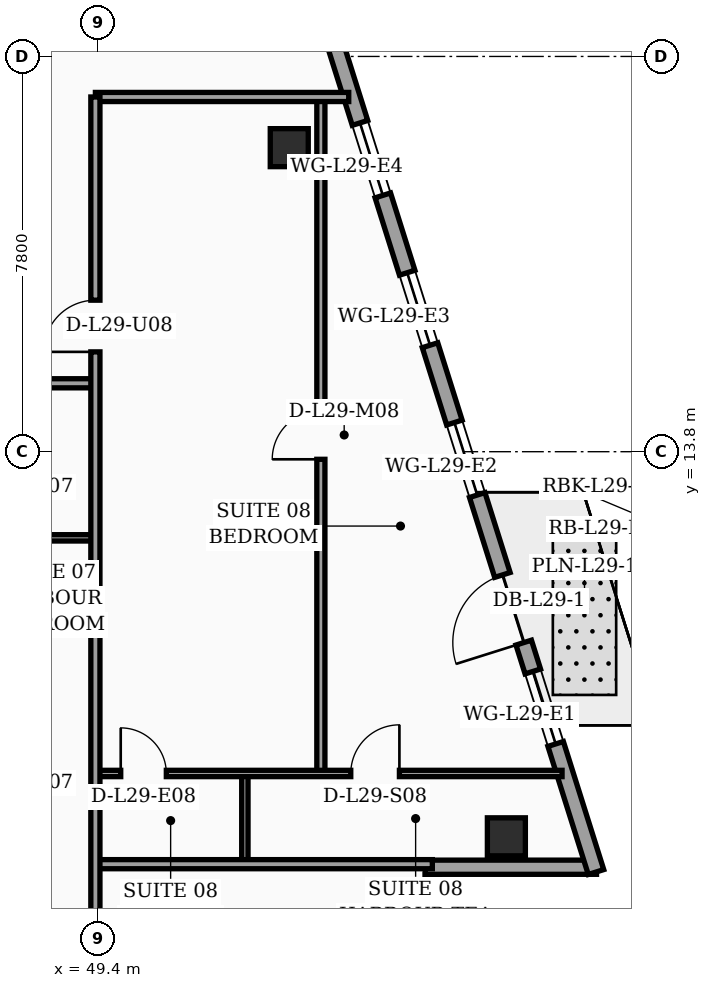
"""IFC4 building model, lengths in metres.
Left out: names, types, materials, properties, quantities, classifications, styles, units other than length and angle.
Written with IfcOpenShell. Run it as: python <this file> out.ifc"""

import sys

from ifc_helpers import new_model, si_unit, direction, frame, frame_2d, origin, origin_2d, place, context, subcontext, project, spatial, rectangle, hollow_rectangle, extrude, element, fill, save


model = new_model("IFC4")
c1 = context("Model", 3, precision=1e-05, world=origin(), true_north=direction((0.0, 1.0)))
c2 = subcontext(c1, "Body", "Model", "MODEL_VIEW")
j1 = project(units=[si_unit("LENGTHUNIT", "METRE"), si_unit("PLANEANGLEUNIT", "RADIAN")], contexts=[c1])
p1 = place(None, origin())
s1 = spatial("IfcSite", under=j1, at=p1, CompositionType="ELEMENT")
p2 = place(p1, origin())
s2 = spatial("IfcBuilding", under=s1, at=p2, CompositionType="ELEMENT")
p3 = place(p2, frame((0.0, 0.0, 120.2)))
s3 = spatial("IfcBuildingStorey", under=s2, at=p3, CompositionType="ELEMENT", Elevation=120.2)
for number, where, z_axis, x_axis in (
    (1, (57.461, 6.2, 0.0), (0.0, 0.0, 1.0), (1.0, 0.0, 0.0)),
    (2, (53.176, 19.8, 0.0), (0.0, 0.0, 1.0), (1.0, 0.0, 0.0)),
):
    element("IfcColumn", number, at=place(p3, frame(where, z_axis=z_axis, x_axis=x_axis)), inside=s3, PredefinedType="COLUMN", context=c2, shape_type="SweptSolid", body=[
        extrude(hollow_rectangle(XDim=0.75, YDim=0.75, WallThickness=0.032, at=origin_2d()), origin(), (0.0, 0.0, 1.0), 3.56),
    ])
p4 = place(p3, frame((56.0, 2.52, 0.0), z_axis=(0.0, 0.0, 1.0), x_axis=(0.0, 1.0, 0.0)))
e3 = element("IfcWall", 3, at=p4, inside=s3, PredefinedType="SOLIDWALL", context=c2, shape_type="SweptSolid", body=[
    extrude(rectangle(XDim=2.94, YDim=0.28, at=frame_2d((1.47, 0.0))), origin(), (0.0, 0.0, 1.0), 3.04),
])
p5 = place(p3, frame((55.86, 5.6, 0.0), z_axis=(0.0, 0.0, 1.0), x_axis=(1.0, 0.0, 0.0)))
e4 = element("IfcWall", 4, at=p5, inside=s3, PredefinedType="SOLIDWALL", context=c2, shape_type="SweptSolid", body=[
    extrude(rectangle(XDim=3.38, YDim=0.28, at=frame_2d((1.69, 0.0))), origin(), (0.0, 0.0, 1.0), 3.04),
])
p6 = place(p3, frame((59.23, 5.505, 0.0), z_axis=(0.0, 0.0, 1.0), x_axis=(-0.300509063924, 0.953778958931, 0.0)))
e5 = element("IfcWall", 5, at=p6, inside=s3, PredefinedType="SOLIDWALL", context=c2, shape_type="SweptSolid", body=[
    extrude(rectangle(XDim=30.814, YDim=0.32, at=frame_2d((15.407, 0.0))), origin(), (0.0, 0.0, 1.0), 3.56),
])
p7 = place(p6, frame((4.747, 0.0, 0.0)))
e6 = element("IfcOpeningElement", 6, at=p7, cuts=e5, PredefinedType="OPENING", context=c2, shape_type="SweptSolid", body=[
    extrude(rectangle(XDim=1.4, YDim=2.25, at=frame_2d((0.7, 1.125))), frame((0.0, 0.17, 0.0), z_axis=(0.0, -1.0, 0.0), x_axis=(1.0, 0.0, 0.0)), (0.0, 0.0, 1.0), 0.34),
])
p8 = place(p6, frame((2.65, 0.0, 0.75)))
e7 = element("IfcOpeningElement", 7, at=p8, cuts=e5, PredefinedType="OPENING", context=c2, shape_type="SweptSolid", body=[
    extrude(rectangle(XDim=1.5, YDim=1.6, at=frame_2d((0.75, 0.8))), frame((0.0, 0.17, 0.0), z_axis=(0.0, -1.0, 0.0), x_axis=(1.0, 0.0, 0.0)), (0.0, 0.0, 1.0), 0.34),
])
p9 = place(p6, frame((7.8, 0.0, 0.75)))
e8 = element("IfcOpeningElement", 8, at=p9, cuts=e5, PredefinedType="OPENING", context=c2, shape_type="SweptSolid", body=[
    extrude(rectangle(XDim=1.5, YDim=1.6, at=frame_2d((0.75, 0.8))), frame((0.0, 0.17, 0.0), z_axis=(0.0, -1.0, 0.0), x_axis=(1.0, 0.0, 0.0)), (0.0, 0.0, 1.0), 0.34),
])
p10 = place(p6, frame((10.9, 0.0, 0.75)))
e9 = element("IfcOpeningElement", 9, at=p10, cuts=e5, PredefinedType="OPENING", context=c2, shape_type="SweptSolid", body=[
    extrude(rectangle(XDim=1.5, YDim=1.6, at=frame_2d((0.75, 0.8))), frame((0.0, 0.17, 0.0), z_axis=(0.0, -1.0, 0.0), x_axis=(1.0, 0.0, 0.0)), (0.0, 0.0, 1.0), 0.34),
])
p11 = place(p6, frame((14.0, 0.0, 0.75)))
e10 = element("IfcOpeningElement", 10, at=p11, cuts=e5, PredefinedType="OPENING", context=c2, shape_type="SweptSolid", body=[
    extrude(rectangle(XDim=1.5, YDim=1.6, at=frame_2d((0.75, 0.8))), frame((0.0, 0.17, 0.0), z_axis=(0.0, -1.0, 0.0), x_axis=(1.0, 0.0, 0.0)), (0.0, 0.0, 1.0), 0.34),
])
p12 = place(p6, frame((17.1, 0.0, 0.75)))
e11 = element("IfcOpeningElement", 11, at=p12, cuts=e5, PredefinedType="OPENING", context=c2, shape_type="SweptSolid", body=[
    extrude(rectangle(XDim=1.5, YDim=1.6, at=frame_2d((0.75, 0.8))), frame((0.0, 0.17, 0.0), z_axis=(0.0, -1.0, 0.0), x_axis=(1.0, 0.0, 0.0)), (0.0, 0.0, 1.0), 0.34),
])
p13 = place(p6, frame((20.2, 0.0, 0.75)))
e12 = element("IfcOpeningElement", 12, at=p13, cuts=e5, PredefinedType="OPENING", context=c2, shape_type="SweptSolid", body=[
    extrude(rectangle(XDim=1.5, YDim=1.6, at=frame_2d((0.75, 0.8))), frame((0.0, 0.17, 0.0), z_axis=(0.0, -1.0, 0.0), x_axis=(1.0, 0.0, 0.0)), (0.0, 0.0, 1.0), 0.34),
])
p14 = place(p6, frame((23.3, 0.0, 0.75)))
e13 = element("IfcOpeningElement", 13, at=p14, cuts=e5, PredefinedType="OPENING", context=c2, shape_type="SweptSolid", body=[
    extrude(rectangle(XDim=1.5, YDim=1.6, at=frame_2d((0.75, 0.8))), frame((0.0, 0.17, 0.0), z_axis=(0.0, -1.0, 0.0), x_axis=(1.0, 0.0, 0.0)), (0.0, 0.0, 1.0), 0.34),
])
p15 = place(p6, frame((26.4, 0.0, 0.75)))
e14 = element("IfcOpeningElement", 14, at=p15, cuts=e5, PredefinedType="OPENING", context=c2, shape_type="SweptSolid", body=[
    extrude(rectangle(XDim=1.5, YDim=1.6, at=frame_2d((0.75, 0.8))), frame((0.0, 0.17, 0.0), z_axis=(0.0, -1.0, 0.0), x_axis=(1.0, 0.0, 0.0)), (0.0, 0.0, 1.0), 0.34),
])
p16 = place(p3, frame((47.42, 12.1, 0.0), z_axis=(0.0, 0.0, 1.0), x_axis=(1.0, 0.0, 0.0)))
e15 = element("IfcWall", 15, at=p16, inside=s3, PredefinedType="PARTITIONING", context=c2, shape_type="SweptSolid", body=[
    extrude(rectangle(XDim=1.93, YDim=0.125, at=frame_2d((0.965, 0.0))), origin(), (0.0, 0.0, 1.0), 2.84),
])
p17 = place(p3, frame((32.4, 15.15, 0.0), z_axis=(0.0, 0.0, 1.0), x_axis=(1.0, 0.0, 0.0)))
e16 = element("IfcWall", 16, at=p17, inside=s3, PredefinedType="PARTITIONING", context=c2, shape_type="SweptSolid", body=[
    extrude(rectangle(XDim=16.95, YDim=0.18, at=frame_2d((8.475, 0.0))), origin(), (0.0, 0.0, 1.0), 2.84),
])
p18 = place(p17, frame((1.1, 0.0, 0.0)))
e17 = element("IfcOpeningElement", 17, at=p18, cuts=e16, PredefinedType="OPENING", context=c2, shape_type="SweptSolid", body=[
    extrude(rectangle(XDim=1.5, YDim=2.22, at=frame_2d((0.75, 1.11))), frame((0.0, 0.1, 0.0), z_axis=(0.0, -1.0, 0.0), x_axis=(1.0, 0.0, 0.0)), (0.0, 0.0, 1.0), 0.2),
])
p19 = place(p17, frame((6.78, 0.0, 0.0)))
e18 = element("IfcOpeningElement", 18, at=p19, cuts=e16, PredefinedType="OPENING", context=c2, shape_type="SweptSolid", body=[
    extrude(rectangle(XDim=1.02, YDim=2.2, at=frame_2d((0.51, 1.1))), frame((0.0, 0.1, 0.0), z_axis=(0.0, -1.0, 0.0), x_axis=(1.0, 0.0, 0.0)), (0.0, 0.0, 1.0), 0.2),
])
p20 = place(p17, frame((12.69, 0.0, 0.0)))
e19 = element("IfcOpeningElement", 19, at=p20, cuts=e16, PredefinedType="OPENING", context=c2, shape_type="SweptSolid", body=[
    extrude(rectangle(XDim=1.02, YDim=2.2, at=frame_2d((0.51, 1.1))), frame((0.0, 0.1, 0.0), z_axis=(0.0, -1.0, 0.0), x_axis=(1.0, 0.0, 0.0)), (0.0, 0.0, 1.0), 0.2),
])
p21 = place(p3, frame((52.3, 5.66, 0.0), z_axis=(0.0, 0.0, 1.0), x_axis=(0.0, 1.0, 0.0)))
e20 = element("IfcWall", 20, at=p21, inside=s3, PredefinedType="PARTITIONING", context=c2, shape_type="SweptSolid", body=[
    extrude(rectangle(XDim=1.79, YDim=0.125, at=frame_2d((0.895, 0.0))), origin(), (0.0, 0.0, 1.0), 3.56),
])
p22 = place(p3, frame((53.8, 7.45, 0.0), z_axis=(0.0, 0.0, 1.0), x_axis=(0.0, 1.0, 0.0)))
e21 = element("IfcWall", 21, at=p22, inside=s3, PredefinedType="PARTITIONING", context=c2, shape_type="SweptSolid", body=[
    extrude(rectangle(XDim=13.35, YDim=0.16, at=frame_2d((6.675, 0.0))), origin(), (0.0, 0.0, 1.0), 3.04),
])
p23 = place(p22, frame((6.2, 0.0, 0.0)))
e22 = element("IfcOpeningElement", 22, at=p23, cuts=e21, PredefinedType="OPENING", context=c2, shape_type="SweptSolid", body=[
    extrude(rectangle(XDim=0.96, YDim=2.2, at=frame_2d((0.48, 1.1))), frame((0.0, 0.09, 0.0), z_axis=(0.0, -1.0, 0.0), x_axis=(1.0, 0.0, 0.0)), (0.0, 0.0, 1.0), 0.18),
])
p24 = place(p3, frame((49.35, 7.45, 0.0), z_axis=(0.0, 0.0, 1.0), x_axis=(1.0, 0.0, 0.0)))
e23 = element("IfcWall", 23, at=p24, inside=s3, PredefinedType="PARTITIONING", context=c2, shape_type="SweptSolid", body=[
    extrude(rectangle(XDim=9.21, YDim=0.125, at=frame_2d((4.605, 0.0))), origin(), (0.0, 0.0, 1.0), 3.04),
])
p25 = place(p24, frame((0.5, 0.0, 0.0)))
e24 = element("IfcOpeningElement", 24, at=p25, cuts=e23, PredefinedType="OPENING", context=c2, shape_type="SweptSolid", body=[
    extrude(rectangle(XDim=0.9, YDim=2.15, at=frame_2d((0.45, 1.075))), frame((0.0, 0.073, 0.0), z_axis=(0.0, -1.0, 0.0), x_axis=(1.0, 0.0, 0.0)), (0.0, 0.0, 1.0), 0.145),
])
p26 = place(p24, frame((5.04, 0.0, 0.0)))
e25 = element("IfcOpeningElement", 25, at=p26, cuts=e23, PredefinedType="OPENING", context=c2, shape_type="SweptSolid", body=[
    extrude(rectangle(XDim=0.96, YDim=2.2, at=frame_2d((0.48, 1.1))), frame((0.0, 0.073, 0.0), z_axis=(0.0, -1.0, 0.0), x_axis=(1.0, 0.0, 0.0)), (0.0, 0.0, 1.0), 0.145),
])
p27 = place(p3, frame((49.35, 5.66, 0.0), z_axis=(0.0, 0.0, 1.0), x_axis=(1.0, 0.0, 0.0)))
e26 = element("IfcWall", 26, at=p27, inside=s3, PredefinedType="PARTITIONING", context=c2, shape_type="SweptSolid", body=[
    extrude(rectangle(XDim=6.65, YDim=0.18, at=frame_2d((3.325, 0.0))), origin(), (0.0, 0.0, 1.0), 2.84),
])
p28 = place(p3, frame((49.35, 20.8, 0.0), z_axis=(0.0, 0.0, 1.0), x_axis=(1.0, 0.0, 0.0)))
e27 = element("IfcWall", 27, at=p28, inside=s3, PredefinedType="PARTITIONING", context=c2, shape_type="SweptSolid", body=[
    extrude(rectangle(XDim=5.0, YDim=0.18, at=frame_2d((2.5, 0.0))), origin(), (0.0, 0.0, 1.0), 3.04),
])
p29 = place(p3, frame((49.35, 2.44, 0.0), z_axis=(0.0, 0.0, 1.0), x_axis=(0.0, 1.0, 0.0)))
e28 = element("IfcWall", 28, at=p29, inside=s3, PredefinedType="PARTITIONING", context=c2, shape_type="SweptSolid", body=[
    extrude(rectangle(XDim=18.36, YDim=0.18, at=frame_2d((9.18, 0.0))), origin(), (0.0, 0.0, 1.0), 2.84),
])
p30 = place(p29, frame((13.33, 0.0, 0.0)))
e29 = element("IfcOpeningElement", 29, at=p30, cuts=e28, PredefinedType="OPENING", context=c2, shape_type="SweptSolid", body=[
    extrude(rectangle(XDim=1.02, YDim=2.2, at=frame_2d((0.51, 1.1))), frame((0.0, 0.1, 0.0), z_axis=(0.0, -1.0, 0.0), x_axis=(1.0, 0.0, 0.0)), (0.0, 0.0, 1.0), 0.2),
])
p31 = place(p7, origin())
e30 = element("IfcDoor", 30, at=p31, inside=s3, OperationType="SINGLE_SWING_LEFT", PredefinedType="DOOR", context=c2, shape_type="SweptSolid", body=[
    extrude(rectangle(XDim=1.4, YDim=2.25, at=frame_2d((0.7, 1.125))), frame((0.0, 0.025, 0.0), z_axis=(0.0, -1.0, 0.0), x_axis=(1.0, 0.0, 0.0)), (0.0, 0.0, 1.0), 0.05),
])
fill(e6, e30)
p32 = place(p8, origin())
e31 = element("IfcWindow", 31, at=p32, inside=s3, PartitioningType="SINGLE_PANEL", PredefinedType="WINDOW", context=c2, shape_type="SweptSolid", body=[
    extrude(rectangle(XDim=1.5, YDim=1.6, at=frame_2d((0.75, 0.8))), frame((0.0, 0.03, 0.0), z_axis=(0.0, -1.0, 0.0), x_axis=(1.0, 0.0, 0.0)), (0.0, 0.0, 1.0), 0.06),
])
fill(e7, e31)
p33 = place(p9, origin())
e32 = element("IfcWindow", 32, at=p33, inside=s3, PartitioningType="SINGLE_PANEL", PredefinedType="WINDOW", context=c2, shape_type="SweptSolid", body=[
    extrude(rectangle(XDim=1.5, YDim=1.6, at=frame_2d((0.75, 0.8))), frame((0.0, 0.03, 0.0), z_axis=(0.0, -1.0, 0.0), x_axis=(1.0, 0.0, 0.0)), (0.0, 0.0, 1.0), 0.06),
])
fill(e8, e32)
p34 = place(p10, origin())
e33 = element("IfcWindow", 33, at=p34, inside=s3, PartitioningType="SINGLE_PANEL", PredefinedType="WINDOW", context=c2, shape_type="SweptSolid", body=[
    extrude(rectangle(XDim=1.5, YDim=1.6, at=frame_2d((0.75, 0.8))), frame((0.0, 0.03, 0.0), z_axis=(0.0, -1.0, 0.0), x_axis=(1.0, 0.0, 0.0)), (0.0, 0.0, 1.0), 0.06),
])
fill(e9, e33)
p35 = place(p11, origin())
e34 = element("IfcWindow", 34, at=p35, inside=s3, PartitioningType="SINGLE_PANEL", PredefinedType="WINDOW", context=c2, shape_type="SweptSolid", body=[
    extrude(rectangle(XDim=1.5, YDim=1.6, at=frame_2d((0.75, 0.8))), frame((0.0, 0.03, 0.0), z_axis=(0.0, -1.0, 0.0), x_axis=(1.0, 0.0, 0.0)), (0.0, 0.0, 1.0), 0.06),
])
fill(e10, e34)
p36 = place(p23, origin())
e35 = element("IfcDoor", 35, at=p36, inside=s3, OperationType="SINGLE_SWING_LEFT", PredefinedType="DOOR", context=c2, shape_type="SweptSolid", body=[
    extrude(rectangle(XDim=0.96, YDim=2.2, at=frame_2d((0.48, 1.1))), frame((0.0, 0.025, 0.0), z_axis=(0.0, -1.0, 0.0), x_axis=(1.0, 0.0, 0.0)), (0.0, 0.0, 1.0), 0.05),
])
fill(e22, e35)
p37 = place(p25, origin())
e36 = element("IfcDoor", 36, at=p37, inside=s3, OperationType="SINGLE_SWING_LEFT", PredefinedType="DOOR", context=c2, shape_type="SweptSolid", body=[
    extrude(rectangle(XDim=0.9, YDim=2.15, at=frame_2d((0.45, 1.075))), frame((0.0, 0.025, 0.0), z_axis=(0.0, -1.0, 0.0), x_axis=(1.0, 0.0, 0.0)), (0.0, 0.0, 1.0), 0.05),
])
fill(e24, e36)
p38 = place(p26, origin())
e37 = element("IfcDoor", 37, at=p38, inside=s3, OperationType="SINGLE_SWING_RIGHT", PredefinedType="DOOR", context=c2, shape_type="SweptSolid", body=[
    extrude(rectangle(XDim=0.96, YDim=2.2, at=frame_2d((0.48, 1.1))), frame((0.0, 0.025, 0.0), z_axis=(0.0, -1.0, 0.0), x_axis=(1.0, 0.0, 0.0)), (0.0, 0.0, 1.0), 0.05),
])
fill(e25, e37)
p39 = place(p30, origin())
e38 = element("IfcDoor", 38, at=p39, inside=s3, OperationType="SINGLE_SWING_LEFT", PredefinedType="DOOR", context=c2, shape_type="SweptSolid", body=[
    extrude(rectangle(XDim=1.02, YDim=2.2, at=frame_2d((0.51, 1.1))), frame((0.0, 0.025, 0.0), z_axis=(0.0, -1.0, 0.0), x_axis=(1.0, 0.0, 0.0)), (0.0, 0.0, 1.0), 0.05),
])
fill(e29, e38)
save(model, sys.argv[1])
